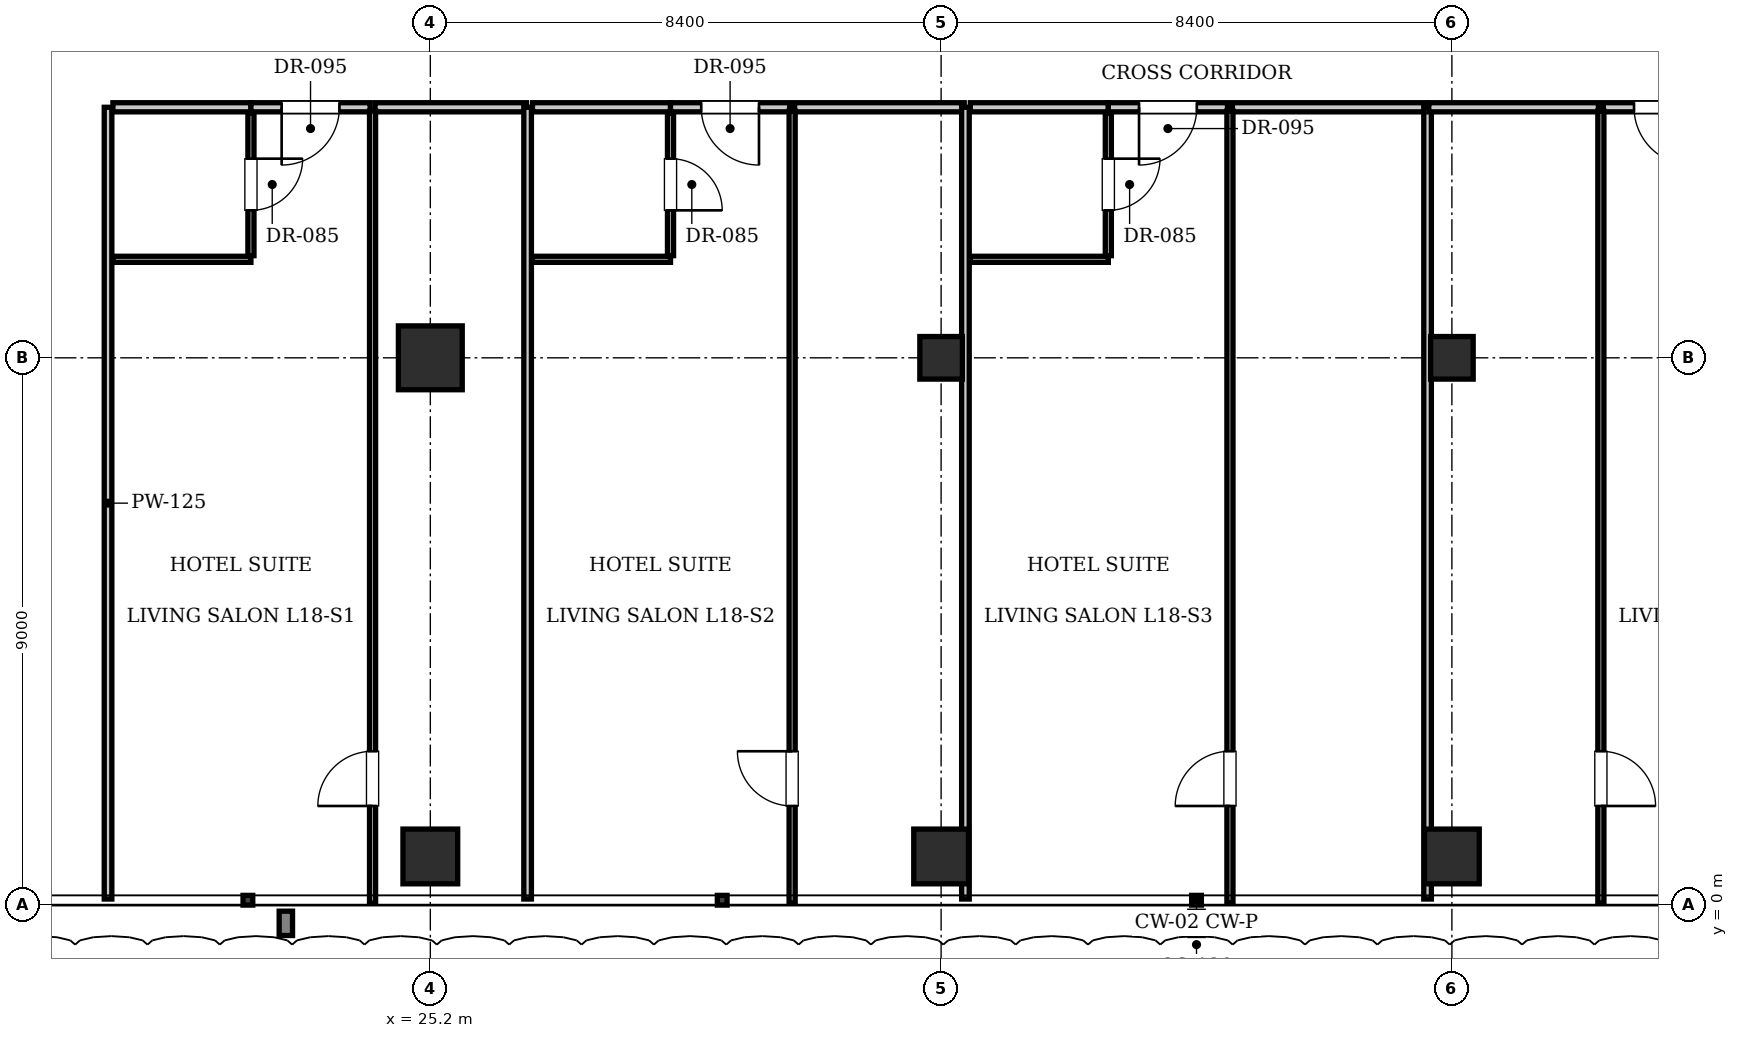
"""IFC4 building model, lengths in metres.
Left out: names, types, materials, properties, quantities, classifications, styles, units other than length and angle.
Written with IfcOpenShell. Run it as: python <this file> out.ifc"""

import sys

from ifc_helpers import new_model, si_unit, direction, frame, frame_2d, origin, origin_2d, place, context, subcontext, project, spatial, rectangle, i_section, extrude, element, fill, save


model = new_model("IFC4")
c1 = context("Model", 3, precision=1e-05, world=origin(), true_north=direction((0.0, 1.0)))
c2 = subcontext(c1, "Body", "Model", "MODEL_VIEW")
j1 = project(units=[si_unit("LENGTHUNIT", "METRE"), si_unit("PLANEANGLEUNIT", "RADIAN")], contexts=[c1])
p1 = place(None, origin())
s1 = spatial("IfcSite", under=j1, at=p1, CompositionType="ELEMENT")
p2 = place(p1, origin())
s2 = spatial("IfcBuilding", under=s1, at=p2, CompositionType="ELEMENT")
p3 = place(p2, frame((0.0, 0.0, 77.0)))
s3 = spatial("IfcBuildingStorey", under=s2, at=p3, CompositionType="ELEMENT", Elevation=77.0)
p4 = place(p3, frame((25.2, 9.0, 0.0), z_axis=(0.0, 0.0, 1.0), x_axis=(1.0, 0.0, 0.0)))
e1 = element("IfcColumn", 1, at=p4, inside=s3, PredefinedType="COLUMN", context=c2, shape_type="SweptSolid", body=[
    extrude(rectangle(XDim=1.05, YDim=1.05, at=origin_2d()), origin(), (0.0, 0.0, 1.0), 3.85),
])
for number, where, z_axis, x_axis in (
    (2, (33.6, 9.0, 0.0), (0.0, 0.0, 1.0), (1.0, 0.0, 0.0)),
    (3, (42.0, 9.0, 0.0), (0.0, 0.0, 1.0), (1.0, 0.0, 0.0)),
):
    element("IfcColumn", number, at=place(p3, frame(where, z_axis=z_axis, x_axis=x_axis)), inside=s3, PredefinedType="COLUMN", context=c2, shape_type="SweptSolid", body=[
        extrude(i_section(OverallWidth=0.7, OverallDepth=0.7, WebThickness=0.028, FlangeThickness=0.044, at=origin_2d()), origin(), (0.0, 0.0, 1.0), 3.85),
    ])
for number, where, z_axis, x_axis in (
    (4, (25.2, 0.8, 0.0), (0.0, 0.0, 1.0), (1.0, 0.0, 0.0)),
    (5, (33.6, 0.8, 0.0), (0.0, 0.0, 1.0), (1.0, 0.0, 0.0)),
    (6, (42.0, 0.8, 0.0), (0.0, 0.0, 1.0), (1.0, 0.0, 0.0)),
):
    element("IfcColumn", number, at=place(p3, frame(where, z_axis=z_axis, x_axis=x_axis)), inside=s3, PredefinedType="COLUMN", context=c2, shape_type="SweptSolid", body=[
        extrude(rectangle(XDim=0.9, YDim=0.9, at=origin_2d()), origin(), (0.0, 0.0, 1.0), 3.85),
    ])
p5 = place(p3, frame((19.9, 0.1, 0.0), z_axis=(0.0, 0.0, 1.0), x_axis=(0.0, 1.0, 0.0)))
e7 = element("IfcWall", 7, at=p5, inside=s3, PredefinedType="PARTITIONING", context=c2, shape_type="SweptSolid", body=[
    extrude(rectangle(XDim=13.02, YDim=0.125, at=frame_2d((6.51, 0.0))), origin(), (0.0, 0.0, 1.0), 3.61),
])
p6 = place(p3, frame((19.98, 13.12, 0.0), z_axis=(0.0, 0.0, 1.0), x_axis=(1.0, 0.0, 0.0)))
e8 = element("IfcWall", 8, at=p6, inside=s3, PredefinedType="PARTITIONING", context=c2, shape_type="SweptSolid", body=[
    extrude(rectangle(XDim=2.27, YDim=0.15, at=frame_2d((1.135, 0.0))), origin(), (0.0, 0.0, 1.0), 3.61),
])
p7 = place(p3, frame((19.98, 10.62, 0.0), z_axis=(0.0, 0.0, 1.0), x_axis=(1.0, 0.0, 0.0)))
e9 = element("IfcWall", 9, at=p7, inside=s3, PredefinedType="PARTITIONING", context=c2, shape_type="SweptSolid", body=[
    extrude(rectangle(XDim=2.27, YDim=0.1, at=frame_2d((1.135, 0.0))), origin(), (0.0, 0.0, 1.0), 3.61),
])
p8 = place(p3, frame((22.25, 10.68, 0.0), z_axis=(0.0, 0.0, 1.0), x_axis=(0.0, 1.0, 0.0)))
e10 = element("IfcWall", 10, at=p8, inside=s3, PredefinedType="PARTITIONING", context=c2, shape_type="SweptSolid", body=[
    extrude(rectangle(XDim=2.34, YDim=0.1, at=frame_2d((1.17, 0.0))), origin(), (0.0, 0.0, 1.0), 3.61),
])
p9 = place(p8, frame((0.745, 0.0, 0.0)))
e11 = element("IfcOpeningElement", 11, at=p9, cuts=e10, PredefinedType="OPENING", context=c2, shape_type="SweptSolid", body=[
    extrude(rectangle(XDim=0.85, YDim=2.1, at=frame_2d((0.425, 1.05))), frame((0.0, 0.06, 0.0), z_axis=(0.0, -1.0, 0.0), x_axis=(1.0, 0.0, 0.0)), (0.0, 0.0, 1.0), 0.12),
])
p10 = place(p3, frame((22.25, 13.12, 0.0), z_axis=(0.0, 0.0, 1.0), x_axis=(1.0, 0.0, 0.0)))
e12 = element("IfcWall", 12, at=p10, inside=s3, PredefinedType="PARTITIONING", context=c2, shape_type="SweptSolid", body=[
    extrude(rectangle(XDim=1.96, YDim=0.15, at=frame_2d((0.98, 0.0))), origin(), (0.0, 0.0, 1.0), 3.61),
])
p11 = place(p10, frame((0.505, 0.0, 0.0)))
e13 = element("IfcOpeningElement", 13, at=p11, cuts=e12, PredefinedType="OPENING", context=c2, shape_type="SweptSolid", body=[
    extrude(rectangle(XDim=0.95, YDim=2.15, at=frame_2d((0.475, 1.075))), frame((0.0, 0.085, 0.0), z_axis=(0.0, -1.0, 0.0), x_axis=(1.0, 0.0, 0.0)), (0.0, 0.0, 1.0), 0.17),
])
p12 = place(p3, frame((24.29, 13.12, 0.0), z_axis=(0.0, 0.0, 1.0), x_axis=(1.0, 0.0, 0.0)))
e14 = element("IfcWall", 14, at=p12, inside=s3, PredefinedType="PARTITIONING", context=c2, shape_type="SweptSolid", body=[
    extrude(rectangle(XDim=2.49, YDim=0.15, at=frame_2d((1.245, 0.0))), origin(), (0.0, 0.0, 1.0), 3.61),
])
p13 = place(p3, frame((24.25, 0.03, 0.0), z_axis=(0.0, 0.0, 1.0), x_axis=(0.0, 1.0, 0.0)))
e15 = element("IfcWall", 15, at=p13, inside=s3, PredefinedType="PARTITIONING", context=c2, shape_type="SweptSolid", body=[
    extrude(rectangle(XDim=13.03, YDim=0.1, at=frame_2d((6.515, 0.0))), origin(), (0.0, 0.0, 1.0), 3.61),
])
p14 = place(p13, frame((1.6, 0.0, 0.0)))
e16 = element("IfcOpeningElement", 16, at=p14, cuts=e15, PredefinedType="OPENING", context=c2, shape_type="SweptSolid", body=[
    extrude(rectangle(XDim=0.9, YDim=2.1, at=frame_2d((0.45, 1.05))), frame((0.0, 0.06, 0.0), z_axis=(0.0, -1.0, 0.0), x_axis=(1.0, 0.0, 0.0)), (0.0, 0.0, 1.0), 0.12),
])
p15 = place(p3, frame((26.8, 0.1, 0.0), z_axis=(0.0, 0.0, 1.0), x_axis=(0.0, 1.0, 0.0)))
e17 = element("IfcWall", 17, at=p15, inside=s3, PredefinedType="PARTITIONING", context=c2, shape_type="SweptSolid", body=[
    extrude(rectangle(XDim=13.02, YDim=0.125, at=frame_2d((6.51, 0.0))), origin(), (0.0, 0.0, 1.0), 3.61),
])
p16 = place(p3, frame((26.88, 13.12, 0.0), z_axis=(0.0, 0.0, 1.0), x_axis=(1.0, 0.0, 0.0)))
e18 = element("IfcWall", 18, at=p16, inside=s3, PredefinedType="PARTITIONING", context=c2, shape_type="SweptSolid", body=[
    extrude(rectangle(XDim=2.27, YDim=0.15, at=frame_2d((1.135, 0.0))), origin(), (0.0, 0.0, 1.0), 3.61),
])
p17 = place(p3, frame((26.88, 10.62, 0.0), z_axis=(0.0, 0.0, 1.0), x_axis=(1.0, 0.0, 0.0)))
e19 = element("IfcWall", 19, at=p17, inside=s3, PredefinedType="PARTITIONING", context=c2, shape_type="SweptSolid", body=[
    extrude(rectangle(XDim=2.27, YDim=0.1, at=frame_2d((1.135, 0.0))), origin(), (0.0, 0.0, 1.0), 3.61),
])
p18 = place(p3, frame((29.15, 10.68, 0.0), z_axis=(0.0, 0.0, 1.0), x_axis=(0.0, 1.0, 0.0)))
e20 = element("IfcWall", 20, at=p18, inside=s3, PredefinedType="PARTITIONING", context=c2, shape_type="SweptSolid", body=[
    extrude(rectangle(XDim=2.34, YDim=0.1, at=frame_2d((1.17, 0.0))), origin(), (0.0, 0.0, 1.0), 3.61),
])
p19 = place(p18, frame((0.745, 0.0, 0.0)))
e21 = element("IfcOpeningElement", 21, at=p19, cuts=e20, PredefinedType="OPENING", context=c2, shape_type="SweptSolid", body=[
    extrude(rectangle(XDim=0.85, YDim=2.1, at=frame_2d((0.425, 1.05))), frame((0.0, 0.06, 0.0), z_axis=(0.0, -1.0, 0.0), x_axis=(1.0, 0.0, 0.0)), (0.0, 0.0, 1.0), 0.12),
])
p20 = place(p3, frame((29.15, 13.12, 0.0), z_axis=(0.0, 0.0, 1.0), x_axis=(1.0, 0.0, 0.0)))
e22 = element("IfcWall", 22, at=p20, inside=s3, PredefinedType="PARTITIONING", context=c2, shape_type="SweptSolid", body=[
    extrude(rectangle(XDim=1.96, YDim=0.15, at=frame_2d((0.98, 0.0))), origin(), (0.0, 0.0, 1.0), 3.61),
])
p21 = place(p20, frame((0.505, 0.0, 0.0)))
e23 = element("IfcOpeningElement", 23, at=p21, cuts=e22, PredefinedType="OPENING", context=c2, shape_type="SweptSolid", body=[
    extrude(rectangle(XDim=0.95, YDim=2.15, at=frame_2d((0.475, 1.075))), frame((0.0, 0.085, 0.0), z_axis=(0.0, -1.0, 0.0), x_axis=(1.0, 0.0, 0.0)), (0.0, 0.0, 1.0), 0.17),
])
p22 = place(p3, frame((31.19, 13.12, 0.0), z_axis=(0.0, 0.0, 1.0), x_axis=(1.0, 0.0, 0.0)))
e24 = element("IfcWall", 24, at=p22, inside=s3, PredefinedType="PARTITIONING", context=c2, shape_type="SweptSolid", body=[
    extrude(rectangle(XDim=2.79, YDim=0.15, at=frame_2d((1.395, 0.0))), origin(), (0.0, 0.0, 1.0), 3.61),
])
p23 = place(p3, frame((31.15, 0.03, 0.0), z_axis=(0.0, 0.0, 1.0), x_axis=(0.0, 1.0, 0.0)))
e25 = element("IfcWall", 25, at=p23, inside=s3, PredefinedType="PARTITIONING", context=c2, shape_type="SweptSolid", body=[
    extrude(rectangle(XDim=13.03, YDim=0.1, at=frame_2d((6.515, 0.0))), origin(), (0.0, 0.0, 1.0), 3.61),
])
p24 = place(p23, frame((1.6, 0.0, 0.0)))
e26 = element("IfcOpeningElement", 26, at=p24, cuts=e25, PredefinedType="OPENING", context=c2, shape_type="SweptSolid", body=[
    extrude(rectangle(XDim=0.9, YDim=2.1, at=frame_2d((0.45, 1.05))), frame((0.0, 0.06, 0.0), z_axis=(0.0, -1.0, 0.0), x_axis=(1.0, 0.0, 0.0)), (0.0, 0.0, 1.0), 0.12),
])
p25 = place(p3, frame((34.0, 0.1, 0.0), z_axis=(0.0, 0.0, 1.0), x_axis=(0.0, 1.0, 0.0)))
e27 = element("IfcWall", 27, at=p25, inside=s3, PredefinedType="PARTITIONING", context=c2, shape_type="SweptSolid", body=[
    extrude(rectangle(XDim=13.02, YDim=0.125, at=frame_2d((6.51, 0.0))), origin(), (0.0, 0.0, 1.0), 3.61),
])
p26 = place(p3, frame((34.08, 13.12, 0.0), z_axis=(0.0, 0.0, 1.0), x_axis=(1.0, 0.0, 0.0)))
e28 = element("IfcWall", 28, at=p26, inside=s3, PredefinedType="PARTITIONING", context=c2, shape_type="SweptSolid", body=[
    extrude(rectangle(XDim=2.27, YDim=0.15, at=frame_2d((1.135, 0.0))), origin(), (0.0, 0.0, 1.0), 3.61),
])
p27 = place(p3, frame((34.08, 10.62, 0.0), z_axis=(0.0, 0.0, 1.0), x_axis=(1.0, 0.0, 0.0)))
e29 = element("IfcWall", 29, at=p27, inside=s3, PredefinedType="PARTITIONING", context=c2, shape_type="SweptSolid", body=[
    extrude(rectangle(XDim=2.27, YDim=0.1, at=frame_2d((1.135, 0.0))), origin(), (0.0, 0.0, 1.0), 3.61),
])
p28 = place(p3, frame((36.35, 10.68, 0.0), z_axis=(0.0, 0.0, 1.0), x_axis=(0.0, 1.0, 0.0)))
e30 = element("IfcWall", 30, at=p28, inside=s3, PredefinedType="PARTITIONING", context=c2, shape_type="SweptSolid", body=[
    extrude(rectangle(XDim=2.34, YDim=0.1, at=frame_2d((1.17, 0.0))), origin(), (0.0, 0.0, 1.0), 3.61),
])
p29 = place(p28, frame((0.745, 0.0, 0.0)))
e31 = element("IfcOpeningElement", 31, at=p29, cuts=e30, PredefinedType="OPENING", context=c2, shape_type="SweptSolid", body=[
    extrude(rectangle(XDim=0.85, YDim=2.1, at=frame_2d((0.425, 1.05))), frame((0.0, 0.06, 0.0), z_axis=(0.0, -1.0, 0.0), x_axis=(1.0, 0.0, 0.0)), (0.0, 0.0, 1.0), 0.12),
])
p30 = place(p3, frame((36.35, 13.12, 0.0), z_axis=(0.0, 0.0, 1.0), x_axis=(1.0, 0.0, 0.0)))
e32 = element("IfcWall", 32, at=p30, inside=s3, PredefinedType="PARTITIONING", context=c2, shape_type="SweptSolid", body=[
    extrude(rectangle(XDim=1.96, YDim=0.15, at=frame_2d((0.98, 0.0))), origin(), (0.0, 0.0, 1.0), 3.61),
])
p31 = place(p30, frame((0.505, 0.0, 0.0)))
e33 = element("IfcOpeningElement", 33, at=p31, cuts=e32, PredefinedType="OPENING", context=c2, shape_type="SweptSolid", body=[
    extrude(rectangle(XDim=0.95, YDim=2.15, at=frame_2d((0.475, 1.075))), frame((0.0, 0.085, 0.0), z_axis=(0.0, -1.0, 0.0), x_axis=(1.0, 0.0, 0.0)), (0.0, 0.0, 1.0), 0.17),
])
p32 = place(p3, frame((38.39, 13.12, 0.0), z_axis=(0.0, 0.0, 1.0), x_axis=(1.0, 0.0, 0.0)))
e34 = element("IfcWall", 34, at=p32, inside=s3, PredefinedType="PARTITIONING", context=c2, shape_type="SweptSolid", body=[
    extrude(rectangle(XDim=3.19, YDim=0.15, at=frame_2d((1.595, 0.0))), origin(), (0.0, 0.0, 1.0), 3.61),
])
p33 = place(p3, frame((38.35, 0.03, 0.0), z_axis=(0.0, 0.0, 1.0), x_axis=(0.0, 1.0, 0.0)))
e35 = element("IfcWall", 35, at=p33, inside=s3, PredefinedType="PARTITIONING", context=c2, shape_type="SweptSolid", body=[
    extrude(rectangle(XDim=13.03, YDim=0.1, at=frame_2d((6.515, 0.0))), origin(), (0.0, 0.0, 1.0), 3.61),
])
p34 = place(p33, frame((1.6, 0.0, 0.0)))
e36 = element("IfcOpeningElement", 36, at=p34, cuts=e35, PredefinedType="OPENING", context=c2, shape_type="SweptSolid", body=[
    extrude(rectangle(XDim=0.9, YDim=2.1, at=frame_2d((0.45, 1.05))), frame((0.0, 0.06, 0.0), z_axis=(0.0, -1.0, 0.0), x_axis=(1.0, 0.0, 0.0)), (0.0, 0.0, 1.0), 0.12),
])
p35 = place(p3, frame((41.6, 0.1, 0.0), z_axis=(0.0, 0.0, 1.0), x_axis=(0.0, 1.0, 0.0)))
e37 = element("IfcWall", 37, at=p35, inside=s3, PredefinedType="PARTITIONING", context=c2, shape_type="SweptSolid", body=[
    extrude(rectangle(XDim=13.02, YDim=0.125, at=frame_2d((6.51, 0.0))), origin(), (0.0, 0.0, 1.0), 3.61),
])
p36 = place(p3, frame((41.62, 13.12, 0.0), z_axis=(0.0, 0.0, 1.0), x_axis=(1.0, 0.0, 0.0)))
e38 = element("IfcWall", 38, at=p36, inside=s3, PredefinedType="PARTITIONING", context=c2, shape_type="SweptSolid", body=[
    extrude(rectangle(XDim=2.79, YDim=0.15, at=frame_2d((1.395, 0.0))), origin(), (0.0, 0.0, 1.0), 3.61),
])
p37 = place(p3, frame((44.49, 13.12, 0.0), z_axis=(0.0, 0.0, 1.0), x_axis=(1.0, 0.0, 0.0)))
e39 = element("IfcWall", 39, at=p37, inside=s3, PredefinedType="PARTITIONING", context=c2, shape_type="SweptSolid", body=[
    extrude(rectangle(XDim=1.96, YDim=0.15, at=frame_2d((0.98, 0.0))), origin(), (0.0, 0.0, 1.0), 3.61),
])
p38 = place(p37, frame((0.505, 0.0, 0.0)))
e40 = element("IfcOpeningElement", 40, at=p38, cuts=e39, PredefinedType="OPENING", context=c2, shape_type="SweptSolid", body=[
    extrude(rectangle(XDim=0.95, YDim=2.15, at=frame_2d((0.475, 1.075))), frame((0.0, 0.085, 0.0), z_axis=(0.0, -1.0, 0.0), x_axis=(1.0, 0.0, 0.0)), (0.0, 0.0, 1.0), 0.17),
])
p39 = place(p3, frame((44.45, 0.03, 0.0), z_axis=(0.0, 0.0, 1.0), x_axis=(0.0, 1.0, 0.0)))
e41 = element("IfcWall", 41, at=p39, inside=s3, PredefinedType="PARTITIONING", context=c2, shape_type="SweptSolid", body=[
    extrude(rectangle(XDim=13.03, YDim=0.1, at=frame_2d((6.515, 0.0))), origin(), (0.0, 0.0, 1.0), 3.61),
])
p40 = place(p39, frame((1.6, 0.0, 0.0)))
e42 = element("IfcOpeningElement", 42, at=p40, cuts=e41, PredefinedType="OPENING", context=c2, shape_type="SweptSolid", body=[
    extrude(rectangle(XDim=0.9, YDim=2.1, at=frame_2d((0.45, 1.05))), frame((0.0, 0.06, 0.0), z_axis=(0.0, -1.0, 0.0), x_axis=(1.0, 0.0, 0.0)), (0.0, 0.0, 1.0), 0.12),
])
p41 = place(p9, frame((0.85, 0.0, 0.0), z_axis=(0.0, 0.0, 1.0), x_axis=(-1.0, 0.0, 0.0)))
e43 = element("IfcDoor", 43, at=p41, inside=s3, OperationType="SINGLE_SWING_LEFT", PredefinedType="DOOR", context=c2, shape_type="SweptSolid", body=[
    extrude(rectangle(XDim=0.85, YDim=2.1, at=frame_2d((0.425, 1.05))), frame((0.0, 0.025, 0.0), z_axis=(0.0, -1.0, 0.0), x_axis=(1.0, 0.0, 0.0)), (0.0, 0.0, 1.0), 0.05),
])
fill(e11, e43)
p42 = place(p11, frame((0.95, 0.0, 0.0), z_axis=(0.0, 0.0, 1.0), x_axis=(-1.0, 0.0, 0.0)))
e44 = element("IfcDoor", 44, at=p42, inside=s3, OperationType="SINGLE_SWING_RIGHT", PredefinedType="DOOR", context=c2, shape_type="SweptSolid", body=[
    extrude(rectangle(XDim=0.95, YDim=2.15, at=frame_2d((0.475, 1.075))), frame((0.0, 0.025, 0.0), z_axis=(0.0, -1.0, 0.0), x_axis=(1.0, 0.0, 0.0)), (0.0, 0.0, 1.0), 0.05),
])
fill(e13, e44)
p43 = place(p14, origin())
e45 = element("IfcDoor", 45, at=p43, inside=s3, OperationType="SINGLE_SWING_LEFT", PredefinedType="DOOR", context=c2, shape_type="SweptSolid", body=[
    extrude(rectangle(XDim=0.9, YDim=2.1, at=frame_2d((0.45, 1.05))), frame((0.0, 0.025, 0.0), z_axis=(0.0, -1.0, 0.0), x_axis=(1.0, 0.0, 0.0)), (0.0, 0.0, 1.0), 0.05),
])
fill(e16, e45)
p44 = place(p19, frame((0.85, 0.0, 0.0), z_axis=(0.0, 0.0, 1.0), x_axis=(-1.0, 0.0, 0.0)))
e46 = element("IfcDoor", 46, at=p44, inside=s3, OperationType="SINGLE_SWING_RIGHT", PredefinedType="DOOR", context=c2, shape_type="SweptSolid", body=[
    extrude(rectangle(XDim=0.85, YDim=2.1, at=frame_2d((0.425, 1.05))), frame((0.0, 0.025, 0.0), z_axis=(0.0, -1.0, 0.0), x_axis=(1.0, 0.0, 0.0)), (0.0, 0.0, 1.0), 0.05),
])
fill(e21, e46)
p45 = place(p21, frame((0.95, 0.0, 0.0), z_axis=(0.0, 0.0, 1.0), x_axis=(-1.0, 0.0, 0.0)))
e47 = element("IfcDoor", 47, at=p45, inside=s3, OperationType="SINGLE_SWING_LEFT", PredefinedType="DOOR", context=c2, shape_type="SweptSolid", body=[
    extrude(rectangle(XDim=0.95, YDim=2.15, at=frame_2d((0.475, 1.075))), frame((0.0, 0.025, 0.0), z_axis=(0.0, -1.0, 0.0), x_axis=(1.0, 0.0, 0.0)), (0.0, 0.0, 1.0), 0.05),
])
fill(e23, e47)
p46 = place(p24, origin())
e48 = element("IfcDoor", 48, at=p46, inside=s3, OperationType="SINGLE_SWING_RIGHT", PredefinedType="DOOR", context=c2, shape_type="SweptSolid", body=[
    extrude(rectangle(XDim=0.9, YDim=2.1, at=frame_2d((0.45, 1.05))), frame((0.0, 0.025, 0.0), z_axis=(0.0, -1.0, 0.0), x_axis=(1.0, 0.0, 0.0)), (0.0, 0.0, 1.0), 0.05),
])
fill(e26, e48)
p47 = place(p29, frame((0.85, 0.0, 0.0), z_axis=(0.0, 0.0, 1.0), x_axis=(-1.0, 0.0, 0.0)))
e49 = element("IfcDoor", 49, at=p47, inside=s3, OperationType="SINGLE_SWING_LEFT", PredefinedType="DOOR", context=c2, shape_type="SweptSolid", body=[
    extrude(rectangle(XDim=0.85, YDim=2.1, at=frame_2d((0.425, 1.05))), frame((0.0, 0.025, 0.0), z_axis=(0.0, -1.0, 0.0), x_axis=(1.0, 0.0, 0.0)), (0.0, 0.0, 1.0), 0.05),
])
fill(e31, e49)
p48 = place(p31, frame((0.95, 0.0, 0.0), z_axis=(0.0, 0.0, 1.0), x_axis=(-1.0, 0.0, 0.0)))
e50 = element("IfcDoor", 50, at=p48, inside=s3, OperationType="SINGLE_SWING_RIGHT", PredefinedType="DOOR", context=c2, shape_type="SweptSolid", body=[
    extrude(rectangle(XDim=0.95, YDim=2.15, at=frame_2d((0.475, 1.075))), frame((0.0, 0.025, 0.0), z_axis=(0.0, -1.0, 0.0), x_axis=(1.0, 0.0, 0.0)), (0.0, 0.0, 1.0), 0.05),
])
fill(e33, e50)
p49 = place(p34, origin())
e51 = element("IfcDoor", 51, at=p49, inside=s3, OperationType="SINGLE_SWING_LEFT", PredefinedType="DOOR", context=c2, shape_type="SweptSolid", body=[
    extrude(rectangle(XDim=0.9, YDim=2.1, at=frame_2d((0.45, 1.05))), frame((0.0, 0.025, 0.0), z_axis=(0.0, -1.0, 0.0), x_axis=(1.0, 0.0, 0.0)), (0.0, 0.0, 1.0), 0.05),
])
fill(e36, e51)
p50 = place(p38, frame((0.95, 0.0, 0.0), z_axis=(0.0, 0.0, 1.0), x_axis=(-1.0, 0.0, 0.0)))
e52 = element("IfcDoor", 52, at=p50, inside=s3, OperationType="SINGLE_SWING_LEFT", PredefinedType="DOOR", context=c2, shape_type="SweptSolid", body=[
    extrude(rectangle(XDim=0.95, YDim=2.15, at=frame_2d((0.475, 1.075))), frame((0.0, 0.025, 0.0), z_axis=(0.0, -1.0, 0.0), x_axis=(1.0, 0.0, 0.0)), (0.0, 0.0, 1.0), 0.05),
])
fill(e40, e52)
p51 = place(p40, frame((0.9, 0.0, 0.0), z_axis=(0.0, 0.0, 1.0), x_axis=(-1.0, 0.0, 0.0)))
e53 = element("IfcDoor", 53, at=p51, inside=s3, OperationType="SINGLE_SWING_RIGHT", PredefinedType="DOOR", context=c2, shape_type="SweptSolid", body=[
    extrude(rectangle(XDim=0.9, YDim=2.1, at=frame_2d((0.45, 1.05))), frame((0.0, 0.025, 0.0), z_axis=(0.0, -1.0, 0.0), x_axis=(1.0, 0.0, 0.0)), (0.0, 0.0, 1.0), 0.05),
])
fill(e42, e53)
save(model, sys.argv[1])
